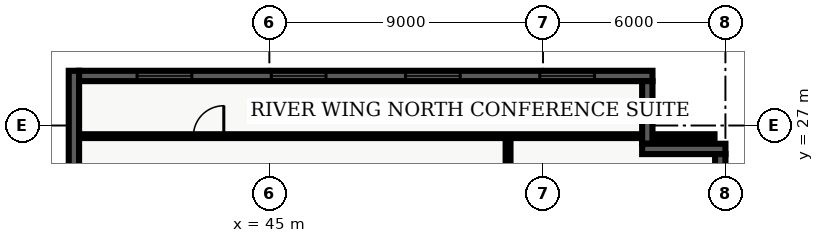
"""IFC4 building model, lengths in metres.
Left out: names, types, materials, properties, quantities, classifications, styles, units other than length and angle.
Written with IfcOpenShell. Run it as: python <this file> out.ifc"""

import sys

from ifc_helpers import new_model, entity, si_unit, converted_unit, direction, frame, origin_with_axes, origin_2d_with_axis, place, context, subcontext, project, spatial, polyline, rectangle, outline, extrude, element, fill, save


model = new_model("IFC4")
c1 = context("Model", 3, precision=1e-05, world=origin_with_axes(), true_north=direction((0.0, 1.0)))
c2 = subcontext(c1, "Body", "Model", "MODEL_VIEW")
j1 = project(units=[si_unit("LENGTHUNIT", "METRE"), converted_unit("PLANEANGLEUNIT", "DEGREE", entity("IfcPlaneAngleMeasure", 0.017), si_unit("PLANEANGLEUNIT", "RADIAN"), dimensions=[0, 0, 0, 0, 0, 0, 0])], contexts=[c1])
p1 = place(None, origin_with_axes())
s1 = spatial("IfcSite", under=j1, at=p1, CompositionType="ELEMENT")
p2 = place(p1, origin_with_axes())
s2 = spatial("IfcBuilding", under=s1, at=p2, CompositionType="ELEMENT")
p3 = place(p2, frame((0.0, 0.0, 144.6), z_axis=(0.0, 0.0, 1.0), x_axis=(1.0, 0.0, 0.0)))
s3 = spatial("IfcBuildingStorey", under=s2, at=p3, CompositionType="ELEMENT", Elevation=144.6)
p4 = place(p3, frame((52.85, 7.85, 0.0), z_axis=(0.0, 0.0, 1.0), x_axis=(0.0, 1.0, 0.0)))
e1 = element("IfcWall", 1, at=p4, inside=s3, PredefinedType="PARTITIONING", context=c2, shape_type="SweptSolid", body=[
    extrude(outline(polyline([(0.0, -0.08), (18.8, -0.08), (18.8, 0.08), (0.0, 0.08), (0.0, -0.08)])), origin_with_axes(), (0.0, 0.0, 1.0), 2.7),
])
p5 = place(p4, frame((4.195, 0.0, 0.0), z_axis=(0.0, 0.0, 1.0), x_axis=(1.0, 0.0, 0.0)))
e2 = element("IfcOpeningElement", 2, at=p5, cuts=e1, PredefinedType="OPENING", context=c2, shape_type="SweptSolid", body=[
    extrude(rectangle(XDim=1.0, YDim=0.18, at=origin_2d_with_axis()), origin_with_axes(), (0.0, 0.0, 1.0), 2.15),
])
p6 = place(p4, frame((13.535, 0.0, 0.0), z_axis=(0.0, 0.0, 1.0), x_axis=(1.0, 0.0, 0.0)))
e3 = element("IfcOpeningElement", 3, at=p6, cuts=e1, PredefinedType="OPENING", context=c2, shape_type="SweptSolid", body=[
    extrude(rectangle(XDim=1.0, YDim=0.18, at=origin_2d_with_axis()), origin_with_axes(), (0.0, 0.0, 1.0), 2.15),
])
p7 = place(p3, frame((38.735, 26.65, 0.0), z_axis=(0.0, 0.0, 1.0), x_axis=(1.0, 0.0, 0.0)))
e4 = element("IfcWall", 4, at=p7, inside=s3, PredefinedType="PARTITIONING", context=c2, shape_type="SweptSolid", body=[
    extrude(outline(polyline([(0.0, -0.062), (20.905, -0.062), (20.905, 0.062), (0.0, 0.062), (0.0, -0.062)])), origin_with_axes(), (0.0, 0.0, 1.0), 2.7),
])
p8 = place(p7, frame((4.265, 0.0, 0.0), z_axis=(0.0, 0.0, 1.0), x_axis=(1.0, 0.0, 0.0)))
e5 = element("IfcOpeningElement", 5, at=p8, cuts=e4, PredefinedType="OPENING", context=c2, shape_type="SweptSolid", body=[
    extrude(rectangle(XDim=1.0, YDim=0.145, at=origin_2d_with_axis()), origin_with_axes(), (0.0, 0.0, 1.0), 2.15),
])
p9 = place(p3, frame((38.57, 21.26, 0.0), z_axis=(0.0, 0.0, 1.0), x_axis=(0.0, 1.0, 0.0)))
e6 = element("IfcWall", 6, at=p9, inside=s3, PredefinedType="SOLIDWALL", context=c2, shape_type="SweptSolid", body=[
    extrude(outline(polyline([(0.0, -0.17), (7.54, -0.17), (7.54, 0.17), (0.0, 0.17), (0.0, -0.17)])), origin_with_axes(), (0.0, 0.0, 1.0), 3.66),
])
p10 = place(p3, frame((38.74, 28.63, 0.0), z_axis=(0.0, 0.0, 1.0), x_axis=(1.0, 0.0, 0.0)))
e7 = element("IfcWall", 7, at=p10, inside=s3, PredefinedType="SOLIDWALL", context=c2, shape_type="SweptSolid", body=[
    extrude(outline(polyline([(0.0, -0.17), (18.86, -0.17), (18.86, 0.17), (0.0, 0.17), (0.0, -0.17)])), origin_with_axes(), (0.0, 0.0, 1.0), 3.66),
])
p11 = place(p10, frame((2.808, 0.0, 0.45), z_axis=(0.0, 0.0, 1.0), x_axis=(1.0, 0.0, 0.0)))
e8 = element("IfcOpeningElement", 8, at=p11, cuts=e7, PredefinedType="OPENING", context=c2, shape_type="SweptSolid", body=[
    extrude(rectangle(XDim=1.8, YDim=0.36, at=origin_2d_with_axis()), origin_with_axes(), (0.0, 0.0, 1.0), 2.1),
])
p12 = place(p10, frame((7.222, 0.0, 0.45), z_axis=(0.0, 0.0, 1.0), x_axis=(1.0, 0.0, 0.0)))
e9 = element("IfcOpeningElement", 9, at=p12, cuts=e7, PredefinedType="OPENING", context=c2, shape_type="SweptSolid", body=[
    extrude(rectangle(XDim=1.8, YDim=0.36, at=origin_2d_with_axis()), origin_with_axes(), (0.0, 0.0, 1.0), 2.1),
])
p13 = place(p10, frame((11.637, 0.0, 0.45), z_axis=(0.0, 0.0, 1.0), x_axis=(1.0, 0.0, 0.0)))
e10 = element("IfcOpeningElement", 10, at=p13, cuts=e7, PredefinedType="OPENING", context=c2, shape_type="SweptSolid", body=[
    extrude(rectangle(XDim=1.8, YDim=0.36, at=origin_2d_with_axis()), origin_with_axes(), (0.0, 0.0, 1.0), 2.1),
])
p14 = place(p10, frame((16.053, 0.0, 0.45), z_axis=(0.0, 0.0, 1.0), x_axis=(1.0, 0.0, 0.0)))
e11 = element("IfcOpeningElement", 11, at=p14, cuts=e7, PredefinedType="OPENING", context=c2, shape_type="SweptSolid", body=[
    extrude(rectangle(XDim=1.8, YDim=0.36, at=origin_2d_with_axis()), origin_with_axes(), (0.0, 0.0, 1.0), 2.1),
])
p15 = place(p3, frame((57.43, 28.46, 0.0), z_axis=(0.0, 0.0, 1.0), x_axis=(0.0, -1.0, 0.0)))
e12 = element("IfcWall", 12, at=p15, inside=s3, PredefinedType="SOLIDWALL", context=c2, shape_type="SweptSolid", body=[
    extrude(outline(polyline([(0.0, -0.17), (2.06, -0.17), (2.06, 0.17), (0.0, 0.17), (0.0, -0.17)])), origin_with_axes(), (0.0, 0.0, 1.0), 3.66),
])
p16 = place(p3, frame((57.26, 26.23, 0.0), z_axis=(0.0, 0.0, 1.0), x_axis=(1.0, 0.0, 0.0)))
e13 = element("IfcWall", 13, at=p16, inside=s3, PredefinedType="SOLIDWALL", context=c2, shape_type="SweptSolid", body=[
    extrude(outline(polyline([(0.0, -0.17), (2.74, -0.17), (2.74, 0.17), (0.0, 0.17), (0.0, -0.17)])), origin_with_axes(), (0.0, 0.0, 1.0), 3.66),
])
p17 = place(p3, frame((59.83, 26.06, 0.0), z_axis=(0.0, 0.0, 1.0), x_axis=(0.0, -1.0, 0.0)))
e14 = element("IfcWall", 14, at=p17, inside=s3, PredefinedType="SOLIDWALL", context=c2, shape_type="SweptSolid", body=[
    extrude(outline(polyline([(0.0, -0.17), (23.66, -0.17), (23.66, 0.17), (0.0, 0.17), (0.0, -0.17)])), origin_with_axes(), (0.0, 0.0, 1.0), 3.66),
])
p18 = place(p17, frame((3.696, 0.0, 0.45), z_axis=(0.0, 0.0, 1.0), x_axis=(1.0, 0.0, 0.0)))
e15 = element("IfcOpeningElement", 15, at=p18, cuts=e14, PredefinedType="OPENING", context=c2, shape_type="SweptSolid", body=[
    extrude(rectangle(XDim=1.8, YDim=0.36, at=origin_2d_with_axis()), origin_with_axes(), (0.0, 0.0, 1.0), 2.1),
])
p19 = place(p17, frame((11.83, 0.0, 0.45), z_axis=(0.0, 0.0, 1.0), x_axis=(1.0, 0.0, 0.0)))
e16 = element("IfcOpeningElement", 16, at=p19, cuts=e14, PredefinedType="OPENING", context=c2, shape_type="SweptSolid", body=[
    extrude(rectangle(XDim=1.8, YDim=0.36, at=origin_2d_with_axis()), origin_with_axes(), (0.0, 0.0, 1.0), 2.1),
])
p20 = place(p17, frame((20.364, 0.0, 0.45), z_axis=(0.0, 0.0, 1.0), x_axis=(1.0, 0.0, 0.0)))
e17 = element("IfcOpeningElement", 17, at=p20, cuts=e14, PredefinedType="OPENING", context=c2, shape_type="SweptSolid", body=[
    extrude(rectangle(XDim=1.8, YDim=0.36, at=origin_2d_with_axis()), origin_with_axes(), (0.0, 0.0, 1.0), 2.1),
])
p21 = place(p7, frame((4.265, 0.0, 0.0), z_axis=(0.0, 0.0, 1.0), x_axis=(1.0, 0.0, 0.0)))
e18 = element("IfcDoor", 18, at=p21, inside=s3, OperationType="SINGLE_SWING_RIGHT", PredefinedType="DOOR", context=c2, shape_type="SweptSolid", body=[
    extrude(rectangle(XDim=1.0, YDim=0.075, at=origin_2d_with_axis()), origin_with_axes(), (0.0, 0.0, 1.0), 2.15),
])
fill(e5, e18)
p22 = place(p10, frame((2.808, 0.0, 0.45), z_axis=(0.0, 0.0, 1.0), x_axis=(1.0, 0.0, 0.0)))
e19 = element("IfcWindow", 19, at=p22, inside=s3, PredefinedType="WINDOW", context=c2, shape_type="SweptSolid", body=[
    extrude(rectangle(XDim=1.8, YDim=0.09, at=origin_2d_with_axis()), origin_with_axes(), (0.0, 0.0, 1.0), 2.1),
])
fill(e8, e19)
p23 = place(p10, frame((7.222, 0.0, 0.45), z_axis=(0.0, 0.0, 1.0), x_axis=(1.0, 0.0, 0.0)))
e20 = element("IfcWindow", 20, at=p23, inside=s3, PredefinedType="WINDOW", context=c2, shape_type="SweptSolid", body=[
    extrude(rectangle(XDim=1.8, YDim=0.09, at=origin_2d_with_axis()), origin_with_axes(), (0.0, 0.0, 1.0), 2.1),
])
fill(e9, e20)
p24 = place(p10, frame((11.637, 0.0, 0.45), z_axis=(0.0, 0.0, 1.0), x_axis=(1.0, 0.0, 0.0)))
e21 = element("IfcWindow", 21, at=p24, inside=s3, PredefinedType="WINDOW", context=c2, shape_type="SweptSolid", body=[
    extrude(rectangle(XDim=1.8, YDim=0.09, at=origin_2d_with_axis()), origin_with_axes(), (0.0, 0.0, 1.0), 2.1),
])
fill(e10, e21)
p25 = place(p10, frame((16.053, 0.0, 0.45), z_axis=(0.0, 0.0, 1.0), x_axis=(1.0, 0.0, 0.0)))
e22 = element("IfcWindow", 22, at=p25, inside=s3, PredefinedType="WINDOW", context=c2, shape_type="SweptSolid", body=[
    extrude(rectangle(XDim=1.8, YDim=0.09, at=origin_2d_with_axis()), origin_with_axes(), (0.0, 0.0, 1.0), 2.1),
])
fill(e11, e22)
save(model, sys.argv[1])
